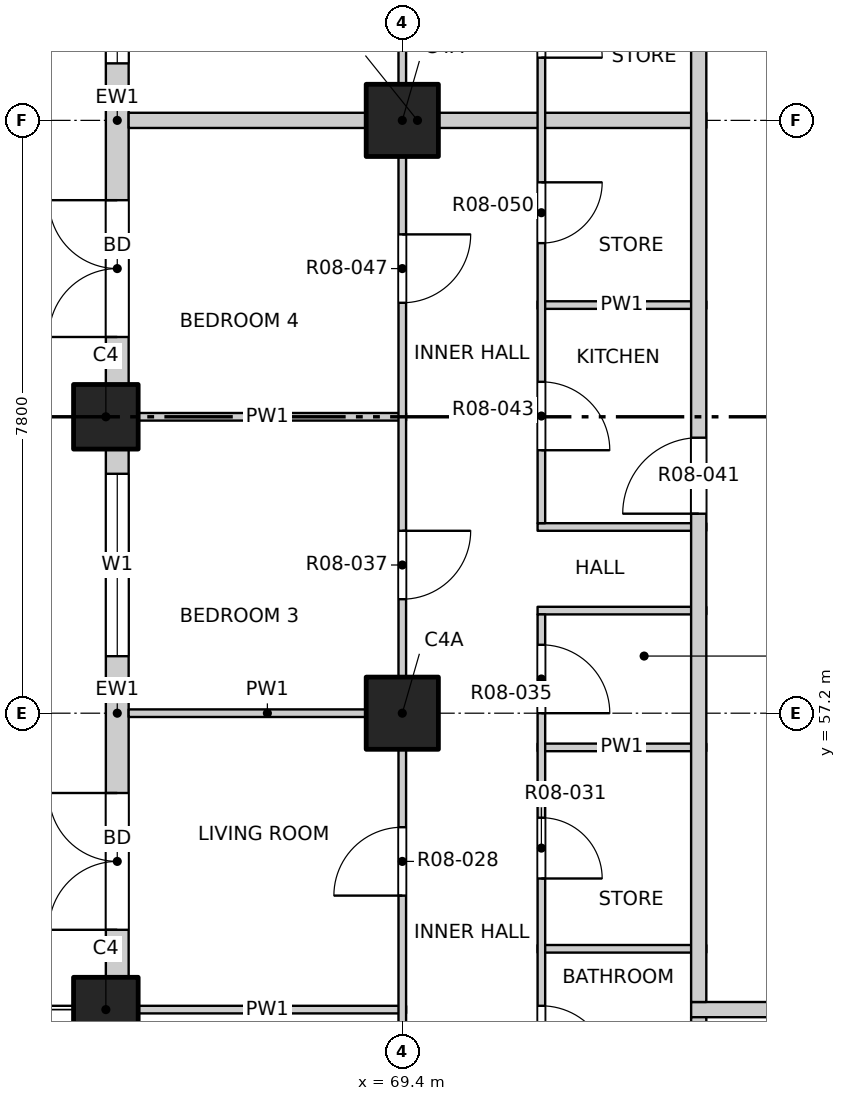
"""IFC4 building model, lengths in metres.
Left out: names, types, materials, properties, quantities, classifications, styles, units other than length and angle.
Written with IfcOpenShell. Run it as: python <this file> out.ifc"""

import sys

from ifc_helpers import new_model, si_unit, direction, frame, frame_2d, origin, origin_2d, place, context, subcontext, project, spatial, rectangle, extrude, element, fill, save


model = new_model("IFC4")
c1 = context("Model", 3, precision=1e-05, world=origin(), true_north=direction((0.0, 1.0)))
c2 = subcontext(c1, "Body", "Model", "MODEL_VIEW")
j1 = project(units=[si_unit("LENGTHUNIT", "METRE"), si_unit("PLANEANGLEUNIT", "RADIAN")], contexts=[c1])
p1 = place(None, origin())
s1 = spatial("IfcSite", under=j1, at=p1, CompositionType="ELEMENT")
p2 = place(p1, origin())
s2 = spatial("IfcBuilding", under=s1, at=p2, CompositionType="ELEMENT")
p3 = place(p2, frame((0.0, 0.0, 103.3)))
s3 = spatial("IfcBuildingStorey", under=s2, at=p3, CompositionType="ELEMENT", Elevation=103.3)
for number, where, z_axis, x_axis in (
    (1, (65.5, 53.3, -0.25), (0.0, 0.0, 1.0), (1.0, 0.0, 0.0)),
    (2, (65.5, 61.1, -0.25), (0.0, 0.0, 1.0), (1.0, 0.0, 0.0)),
):
    element("IfcColumn", number, at=place(p3, frame(where, z_axis=z_axis, x_axis=x_axis)), inside=s3, PredefinedType="COLUMN", context=c2, shape_type="SweptSolid", body=[
        extrude(rectangle(XDim=0.85, YDim=0.85, at=origin_2d()), origin(), (0.0, 0.0, 1.0), 3.4),
    ])
for number, where, z_axis, x_axis in (
    (3, (69.4, 57.2, -0.25), (0.0, 0.0, 1.0), (1.0, 0.0, 0.0)),
    (4, (69.4, 65.0, -0.25), (0.0, 0.0, 1.0), (1.0, 0.0, 0.0)),
):
    element("IfcColumn", number, at=place(p3, frame(where, z_axis=z_axis, x_axis=x_axis)), inside=s3, PredefinedType="COLUMN", context=c2, shape_type="SweptSolid", body=[
        extrude(rectangle(XDim=0.95, YDim=0.95, at=origin_2d()), origin(), (0.0, 0.0, 1.0), 3.4),
    ])
p4 = place(p3, frame((65.65, 53.725, 0.0), z_axis=(0.0, 0.0, 1.0), x_axis=(0.0, 1.0, 0.0)))
e5 = element("IfcWall", 5, at=p4, inside=s3, PredefinedType="SOLIDWALL", context=c2, shape_type="SweptSolid", body=[
    extrude(rectangle(XDim=6.95, YDim=0.3, at=frame_2d((3.475, 0.0))), origin(), (0.0, 0.0, 1.0), 2.7),
])
p5 = place(p4, frame((0.625, 0.0, 0.0)))
e6 = element("IfcOpeningElement", 6, at=p5, cuts=e5, PredefinedType="OPENING", context=c2, shape_type="SweptSolid", body=[
    extrude(rectangle(XDim=1.8, YDim=2.4, at=frame_2d((0.9, 1.2))), frame((0.0, 0.16, 0.0), z_axis=(0.0, -1.0, 0.0), x_axis=(1.0, 0.0, 0.0)), (0.0, 0.0, 1.0), 0.32),
])
p6 = place(p4, frame((4.225, 0.0, 0.9)))
e7 = element("IfcOpeningElement", 7, at=p6, cuts=e5, PredefinedType="OPENING", context=c2, shape_type="SweptSolid", body=[
    extrude(rectangle(XDim=2.4, YDim=1.8, at=frame_2d((1.2, 0.9))), frame((0.0, 0.16, 0.0), z_axis=(0.0, -1.0, 0.0), x_axis=(1.0, 0.0, 0.0)), (0.0, 0.0, 1.0), 0.32),
])
p7 = place(p3, frame((65.65, 61.525, 0.0), z_axis=(0.0, 0.0, 1.0), x_axis=(0.0, 1.0, 0.0)))
e8 = element("IfcWall", 8, at=p7, inside=s3, PredefinedType="SOLIDWALL", context=c2, shape_type="SweptSolid", body=[
    extrude(rectangle(XDim=6.95, YDim=0.3, at=frame_2d((3.475, 0.0))), origin(), (0.0, 0.0, 1.0), 2.7),
])
p8 = place(p7, frame((0.625, 0.0, 0.0)))
e9 = element("IfcOpeningElement", 9, at=p8, cuts=e8, PredefinedType="OPENING", context=c2, shape_type="SweptSolid", body=[
    extrude(rectangle(XDim=1.8, YDim=2.4, at=frame_2d((0.9, 1.2))), frame((0.0, 0.16, 0.0), z_axis=(0.0, -1.0, 0.0), x_axis=(1.0, 0.0, 0.0)), (0.0, 0.0, 1.0), 0.32),
])
p9 = place(p7, frame((4.225, 0.0, 0.9)))
e10 = element("IfcOpeningElement", 10, at=p9, cuts=e8, PredefinedType="OPENING", context=c2, shape_type="SweptSolid", body=[
    extrude(rectangle(XDim=2.4, YDim=1.8, at=frame_2d((1.2, 0.9))), frame((0.0, 0.16, 0.0), z_axis=(0.0, -1.0, 0.0), x_axis=(1.0, 0.0, 0.0)), (0.0, 0.0, 1.0), 0.32),
])
p10 = place(p3, frame((65.8, 53.3, 0.0), z_axis=(0.0, 0.0, 1.0), x_axis=(1.0, 0.0, 0.0)))
e11 = element("IfcWall", 11, at=p10, inside=s3, PredefinedType="PARTITIONING", context=c2, shape_type="SweptSolid", body=[
    extrude(rectangle(XDim=3.65, YDim=0.1, at=frame_2d((1.825, 0.0))), origin(), (0.0, 0.0, 1.0), 3.15),
])
p11 = place(p3, frame((73.2, 53.3, 0.0), z_axis=(0.0, 0.0, 1.0), x_axis=(1.0, 0.0, 0.0)))
e12 = element("IfcWall", 12, at=p11, inside=s3, PredefinedType="PARTITIONING", context=c2, shape_type="SweptSolid", body=[
    extrude(rectangle(XDim=23.6, YDim=0.2, at=frame_2d((11.8, 0.0))), origin(), (0.0, 0.0, 1.0), 3.15),
])
p12 = place(p11, frame((5.975, 0.0, 0.0)))
e13 = element("IfcOpeningElement", 13, at=p12, cuts=e12, PredefinedType="OPENING", context=c2, shape_type="SweptSolid", body=[
    extrude(rectangle(XDim=1.0, YDim=2.1, at=frame_2d((0.5, 1.05))), frame((0.0, 0.11, 0.0), z_axis=(0.0, -1.0, 0.0), x_axis=(1.0, 0.0, 0.0)), (0.0, 0.0, 1.0), 0.22),
])
p13 = place(p11, frame((18.075, 0.0, 0.0)))
e14 = element("IfcOpeningElement", 14, at=p13, cuts=e12, PredefinedType="OPENING", context=c2, shape_type="SweptSolid", body=[
    extrude(rectangle(XDim=1.0, YDim=2.1, at=frame_2d((0.5, 1.05))), frame((0.0, 0.11, 0.0), z_axis=(0.0, -1.0, 0.0), x_axis=(1.0, 0.0, 0.0)), (0.0, 0.0, 1.0), 0.22),
])
for number, where, z_axis, x_axis in (
    (15, (71.18, 54.1, 0.0), (0.0, 0.0, 1.0), (1.0, 0.0, 0.0)),
    (16, (71.18, 56.75, 0.0), (0.0, 0.0, 1.0), (1.0, 0.0, 0.0)),
):
    element("IfcWall", number, at=place(p3, frame(where, z_axis=z_axis, x_axis=x_axis)), inside=s3, PredefinedType="PARTITIONING", context=c2, shape_type="SweptSolid", body=[
        extrude(rectangle(XDim=2.22, YDim=0.1, at=frame_2d((1.11, 0.0))), origin(), (0.0, 0.0, 1.0), 3.15),
    ])
p14 = place(p3, frame((65.8, 57.2, 0.0), z_axis=(0.0, 0.0, 1.0), x_axis=(1.0, 0.0, 0.0)))
e17 = element("IfcWall", 17, at=p14, inside=s3, PredefinedType="PARTITIONING", context=c2, shape_type="SweptSolid", body=[
    extrude(rectangle(XDim=3.65, YDim=0.1, at=frame_2d((1.825, 0.0))), origin(), (0.0, 0.0, 1.0), 3.15),
])
for number, where, z_axis, x_axis in (
    (18, (71.18, 58.55, 0.0), (0.0, 0.0, 1.0), (1.0, 0.0, 0.0)),
    (19, (71.18, 59.65, 0.0), (0.0, 0.0, 1.0), (1.0, 0.0, 0.0)),
):
    element("IfcWall", number, at=place(p3, frame(where, z_axis=z_axis, x_axis=x_axis)), inside=s3, PredefinedType="PARTITIONING", context=c2, shape_type="SweptSolid", body=[
        extrude(rectangle(XDim=2.22, YDim=0.1, at=frame_2d((1.11, 0.0))), origin(), (0.0, 0.0, 1.0), 3.15),
    ])
p15 = place(p3, frame((65.8, 61.1, 0.0), z_axis=(0.0, 0.0, 1.0), x_axis=(1.0, 0.0, 0.0)))
e20 = element("IfcWall", 20, at=p15, inside=s3, PredefinedType="PARTITIONING", context=c2, shape_type="SweptSolid", body=[
    extrude(rectangle(XDim=3.65, YDim=0.1, at=frame_2d((1.825, 0.0))), origin(), (0.0, 0.0, 1.0), 2.55),
])
p16 = place(p3, frame((71.18, 62.57, 0.0), z_axis=(0.0, 0.0, 1.0), x_axis=(1.0, 0.0, 0.0)))
e21 = element("IfcWall", 21, at=p16, inside=s3, PredefinedType="PARTITIONING", context=c2, shape_type="SweptSolid", body=[
    extrude(rectangle(XDim=2.22, YDim=0.1, at=frame_2d((1.11, 0.0))), origin(), (0.0, 0.0, 1.0), 3.15),
])
p17 = place(p3, frame((65.8, 65.0, 0.0), z_axis=(0.0, 0.0, 1.0), x_axis=(1.0, 0.0, 0.0)))
e22 = element("IfcWall", 22, at=p17, inside=s3, PredefinedType="PARTITIONING", context=c2, shape_type="SweptSolid", body=[
    extrude(rectangle(XDim=7.6, YDim=0.2, at=frame_2d((3.8, 0.0))), origin(), (0.0, 0.0, 1.0), 3.15),
])
p18 = place(p3, frame((69.4, 45.8, 0.0), z_axis=(0.0, 0.0, 1.0), x_axis=(0.0, 1.0, 0.0)))
e23 = element("IfcWall", 23, at=p18, inside=s3, PredefinedType="PARTITIONING", context=c2, shape_type="SweptSolid", body=[
    extrude(rectangle(XDim=38.4, YDim=0.1, at=frame_2d((19.2, 0.0))), origin(), (0.0, 0.0, 1.0), 3.15),
])
p19 = place(p18, frame((1.05, 0.0, 0.0)))
e24 = element("IfcOpeningElement", 24, at=p19, cuts=e23, PredefinedType="OPENING", context=c2, shape_type="SweptSolid", body=[
    extrude(rectangle(XDim=1.2, YDim=2.1, at=frame_2d((0.6, 1.05))), frame((0.0, 0.06, 0.0), z_axis=(0.0, -1.0, 0.0), x_axis=(1.0, 0.0, 0.0)), (0.0, 0.0, 1.0), 0.12),
])
p20 = place(p18, frame((5.1, 0.0, 0.0)))
e25 = element("IfcOpeningElement", 25, at=p20, cuts=e23, PredefinedType="OPENING", context=c2, shape_type="SweptSolid", body=[
    extrude(rectangle(XDim=0.9, YDim=2.1, at=frame_2d((0.45, 1.05))), frame((0.0, 0.06, 0.0), z_axis=(0.0, -1.0, 0.0), x_axis=(1.0, 0.0, 0.0)), (0.0, 0.0, 1.0), 0.12),
])
p21 = place(p18, frame((9.0, 0.0, 0.0)))
e26 = element("IfcOpeningElement", 26, at=p21, cuts=e23, PredefinedType="OPENING", context=c2, shape_type="SweptSolid", body=[
    extrude(rectangle(XDim=0.9, YDim=2.1, at=frame_2d((0.45, 1.05))), frame((0.0, 0.06, 0.0), z_axis=(0.0, -1.0, 0.0), x_axis=(1.0, 0.0, 0.0)), (0.0, 0.0, 1.0), 0.12),
])
p22 = place(p18, frame((12.9, 0.0, 0.0)))
e27 = element("IfcOpeningElement", 27, at=p22, cuts=e23, PredefinedType="OPENING", context=c2, shape_type="SweptSolid", body=[
    extrude(rectangle(XDim=0.9, YDim=2.1, at=frame_2d((0.45, 1.05))), frame((0.0, 0.06, 0.0), z_axis=(0.0, -1.0, 0.0), x_axis=(1.0, 0.0, 0.0)), (0.0, 0.0, 1.0), 0.12),
])
p23 = place(p18, frame((16.8, 0.0, 0.0)))
e28 = element("IfcOpeningElement", 28, at=p23, cuts=e23, PredefinedType="OPENING", context=c2, shape_type="SweptSolid", body=[
    extrude(rectangle(XDim=0.9, YDim=2.1, at=frame_2d((0.45, 1.05))), frame((0.0, 0.06, 0.0), z_axis=(0.0, -1.0, 0.0), x_axis=(1.0, 0.0, 0.0)), (0.0, 0.0, 1.0), 0.12),
])
p24 = place(p18, frame((20.7, 0.0, 0.0)))
e29 = element("IfcOpeningElement", 29, at=p24, cuts=e23, PredefinedType="OPENING", context=c2, shape_type="SweptSolid", body=[
    extrude(rectangle(XDim=0.9, YDim=2.1, at=frame_2d((0.45, 1.05))), frame((0.0, 0.06, 0.0), z_axis=(0.0, -1.0, 0.0), x_axis=(1.0, 0.0, 0.0)), (0.0, 0.0, 1.0), 0.12),
])
p25 = place(p18, frame((24.6, 0.0, 0.0)))
e30 = element("IfcOpeningElement", 30, at=p25, cuts=e23, PredefinedType="OPENING", context=c2, shape_type="SweptSolid", body=[
    extrude(rectangle(XDim=0.9, YDim=2.1, at=frame_2d((0.45, 1.05))), frame((0.0, 0.06, 0.0), z_axis=(0.0, -1.0, 0.0), x_axis=(1.0, 0.0, 0.0)), (0.0, 0.0, 1.0), 0.12),
])
p26 = place(p18, frame((28.5, 0.0, 0.0)))
e31 = element("IfcOpeningElement", 31, at=p26, cuts=e23, PredefinedType="OPENING", context=c2, shape_type="SweptSolid", body=[
    extrude(rectangle(XDim=0.9, YDim=2.1, at=frame_2d((0.45, 1.05))), frame((0.0, 0.06, 0.0), z_axis=(0.0, -1.0, 0.0), x_axis=(1.0, 0.0, 0.0)), (0.0, 0.0, 1.0), 0.12),
])
p27 = place(p18, frame((32.4, 0.0, 0.0)))
e32 = element("IfcOpeningElement", 32, at=p27, cuts=e23, PredefinedType="OPENING", context=c2, shape_type="SweptSolid", body=[
    extrude(rectangle(XDim=0.9, YDim=2.1, at=frame_2d((0.45, 1.05))), frame((0.0, 0.06, 0.0), z_axis=(0.0, -1.0, 0.0), x_axis=(1.0, 0.0, 0.0)), (0.0, 0.0, 1.0), 0.12),
])
p28 = place(p18, frame((36.15, 0.0, 0.0)))
e33 = element("IfcOpeningElement", 33, at=p28, cuts=e23, PredefinedType="OPENING", context=c2, shape_type="SweptSolid", body=[
    extrude(rectangle(XDim=1.2, YDim=2.1, at=frame_2d((0.6, 1.05))), frame((0.0, 0.06, 0.0), z_axis=(0.0, -1.0, 0.0), x_axis=(1.0, 0.0, 0.0)), (0.0, 0.0, 1.0), 0.12),
])
p29 = place(p3, frame((71.23, 49.45, 0.0), z_axis=(0.0, 0.0, 1.0), x_axis=(0.0, 1.0, 0.0)))
e34 = element("IfcWall", 34, at=p29, inside=s3, PredefinedType="PARTITIONING", context=c2, shape_type="SweptSolid", body=[
    extrude(rectangle(XDim=9.05, YDim=0.1, at=frame_2d((4.525, 0.0))), origin(), (0.0, 0.0, 1.0), 3.15),
])
p30 = place(p29, frame((0.7, 0.0, 0.0)))
e35 = element("IfcOpeningElement", 35, at=p30, cuts=e34, PredefinedType="OPENING", context=c2, shape_type="SweptSolid", body=[
    extrude(rectangle(XDim=0.8, YDim=2.1, at=frame_2d((0.4, 1.05))), frame((0.0, 0.06, 0.0), z_axis=(0.0, -1.0, 0.0), x_axis=(1.0, 0.0, 0.0)), (0.0, 0.0, 1.0), 0.12),
])
p31 = place(p29, frame((3.0, 0.0, 0.0)))
e36 = element("IfcOpeningElement", 36, at=p31, cuts=e34, PredefinedType="OPENING", context=c2, shape_type="SweptSolid", body=[
    extrude(rectangle(XDim=0.9, YDim=2.1, at=frame_2d((0.45, 1.05))), frame((0.0, 0.06, 0.0), z_axis=(0.0, -1.0, 0.0), x_axis=(1.0, 0.0, 0.0)), (0.0, 0.0, 1.0), 0.12),
])
p32 = place(p29, frame((5.575, 0.0, 0.0)))
e37 = element("IfcOpeningElement", 37, at=p32, cuts=e34, PredefinedType="OPENING", context=c2, shape_type="SweptSolid", body=[
    extrude(rectangle(XDim=0.8, YDim=2.1, at=frame_2d((0.4, 1.05))), frame((0.0, 0.06, 0.0), z_axis=(0.0, -1.0, 0.0), x_axis=(1.0, 0.0, 0.0)), (0.0, 0.0, 1.0), 0.12),
])
p33 = place(p29, frame((7.75, 0.0, 0.0)))
e38 = element("IfcOpeningElement", 38, at=p33, cuts=e34, PredefinedType="OPENING", context=c2, shape_type="SweptSolid", body=[
    extrude(rectangle(XDim=0.9, YDim=2.1, at=frame_2d((0.45, 1.05))), frame((0.0, 0.06, 0.0), z_axis=(0.0, -1.0, 0.0), x_axis=(1.0, 0.0, 0.0)), (0.0, 0.0, 1.0), 0.12),
])
p34 = place(p3, frame((71.23, 59.7, 0.0), z_axis=(0.0, 0.0, 1.0), x_axis=(0.0, 1.0, 0.0)))
e39 = element("IfcWall", 39, at=p34, inside=s3, PredefinedType="PARTITIONING", context=c2, shape_type="SweptSolid", body=[
    extrude(rectangle(XDim=10.9, YDim=0.1, at=frame_2d((5.45, 0.0))), origin(), (0.0, 0.0, 1.0), 3.15),
])
p35 = place(p34, frame((0.96, 0.0, 0.0)))
e40 = element("IfcOpeningElement", 40, at=p35, cuts=e39, PredefinedType="OPENING", context=c2, shape_type="SweptSolid", body=[
    extrude(rectangle(XDim=0.9, YDim=2.1, at=frame_2d((0.45, 1.05))), frame((0.0, 0.06, 0.0), z_axis=(0.0, -1.0, 0.0), x_axis=(1.0, 0.0, 0.0)), (0.0, 0.0, 1.0), 0.12),
])
p36 = place(p34, frame((3.685, 0.0, 0.0)))
e41 = element("IfcOpeningElement", 41, at=p36, cuts=e39, PredefinedType="OPENING", context=c2, shape_type="SweptSolid", body=[
    extrude(rectangle(XDim=0.8, YDim=2.1, at=frame_2d((0.4, 1.05))), frame((0.0, 0.06, 0.0), z_axis=(0.0, -1.0, 0.0), x_axis=(1.0, 0.0, 0.0)), (0.0, 0.0, 1.0), 0.12),
])
p37 = place(p34, frame((6.125, 0.0, 0.0)))
e42 = element("IfcOpeningElement", 42, at=p37, cuts=e39, PredefinedType="OPENING", context=c2, shape_type="SweptSolid", body=[
    extrude(rectangle(XDim=0.8, YDim=2.1, at=frame_2d((0.4, 1.05))), frame((0.0, 0.06, 0.0), z_axis=(0.0, -1.0, 0.0), x_axis=(1.0, 0.0, 0.0)), (0.0, 0.0, 1.0), 0.12),
])
p38 = place(p34, frame((8.9, 0.0, 0.0)))
e43 = element("IfcOpeningElement", 43, at=p38, cuts=e39, PredefinedType="OPENING", context=c2, shape_type="SweptSolid", body=[
    extrude(rectangle(XDim=0.9, YDim=2.1, at=frame_2d((0.45, 1.05))), frame((0.0, 0.06, 0.0), z_axis=(0.0, -1.0, 0.0), x_axis=(1.0, 0.0, 0.0)), (0.0, 0.0, 1.0), 0.12),
])
p39 = place(p3, frame((73.3, 45.8, 0.0), z_axis=(0.0, 0.0, 1.0), x_axis=(0.0, 1.0, 0.0)))
e44 = element("IfcWall", 44, at=p39, inside=s3, PredefinedType="PARTITIONING", context=c2, shape_type="SweptSolid", body=[
    extrude(rectangle(XDim=7.4, YDim=0.2, at=frame_2d((3.7, 0.0))), origin(), (0.0, 0.0, 1.0), 3.15),
])
p40 = place(p3, frame((73.3, 53.4, 0.0), z_axis=(0.0, 0.0, 1.0), x_axis=(0.0, 1.0, 0.0)))
e45 = element("IfcWall", 45, at=p40, inside=s3, PredefinedType="PARTITIONING", context=c2, shape_type="SweptSolid", body=[
    extrude(rectangle(XDim=30.8, YDim=0.2, at=frame_2d((15.4, 0.0))), origin(), (0.0, 0.0, 1.0), 3.15),
])
p41 = place(p40, frame((6.425, 0.0, 0.0)))
e46 = element("IfcOpeningElement", 46, at=p41, cuts=e45, PredefinedType="OPENING", context=c2, shape_type="SweptSolid", body=[
    extrude(rectangle(XDim=1.0, YDim=2.1, at=frame_2d((0.5, 1.05))), frame((0.0, 0.11, 0.0), z_axis=(0.0, -1.0, 0.0), x_axis=(1.0, 0.0, 0.0)), (0.0, 0.0, 1.0), 0.22),
])
p42 = place(p40, frame((18.525, 0.0, 0.0)))
e47 = element("IfcOpeningElement", 47, at=p42, cuts=e45, PredefinedType="OPENING", context=c2, shape_type="SweptSolid", body=[
    extrude(rectangle(XDim=1.0, YDim=2.1, at=frame_2d((0.5, 1.05))), frame((0.0, 0.11, 0.0), z_axis=(0.0, -1.0, 0.0), x_axis=(1.0, 0.0, 0.0)), (0.0, 0.0, 1.0), 0.22),
])
p43 = place(p5, origin())
e48 = element("IfcDoor", 48, at=p43, inside=s3, OperationType="DOUBLE_DOOR_SINGLE_SWING", PredefinedType="DOOR", context=c2, shape_type="SweptSolid", body=[
    extrude(rectangle(XDim=1.8, YDim=2.4, at=frame_2d((0.9, 1.2))), frame((0.0, 0.025, 0.0), z_axis=(0.0, -1.0, 0.0), x_axis=(1.0, 0.0, 0.0)), (0.0, 0.0, 1.0), 0.05),
])
fill(e6, e48)
p44 = place(p6, origin())
e49 = element("IfcWindow", 49, at=p44, inside=s3, PartitioningType="DOUBLE_PANEL_VERTICAL", PredefinedType="WINDOW", context=c2, shape_type="SweptSolid", body=[
    extrude(rectangle(XDim=2.4, YDim=1.8, at=frame_2d((1.2, 0.9))), frame((0.0, 0.03, 0.0), z_axis=(0.0, -1.0, 0.0), x_axis=(1.0, 0.0, 0.0)), (0.0, 0.0, 1.0), 0.06),
])
fill(e7, e49)
p45 = place(p8, origin())
e50 = element("IfcDoor", 50, at=p45, inside=s3, OperationType="DOUBLE_DOOR_SINGLE_SWING", PredefinedType="DOOR", context=c2, shape_type="SweptSolid", body=[
    extrude(rectangle(XDim=1.8, YDim=2.4, at=frame_2d((0.9, 1.2))), frame((0.0, 0.025, 0.0), z_axis=(0.0, -1.0, 0.0), x_axis=(1.0, 0.0, 0.0)), (0.0, 0.0, 1.0), 0.05),
])
fill(e9, e50)
p46 = place(p9, origin())
e51 = element("IfcWindow", 51, at=p46, inside=s3, PartitioningType="DOUBLE_PANEL_VERTICAL", PredefinedType="WINDOW", context=c2, shape_type="SweptSolid", body=[
    extrude(rectangle(XDim=2.4, YDim=1.8, at=frame_2d((1.2, 0.9))), frame((0.0, 0.03, 0.0), z_axis=(0.0, -1.0, 0.0), x_axis=(1.0, 0.0, 0.0)), (0.0, 0.0, 1.0), 0.06),
])
fill(e10, e51)
p47 = place(p31, origin())
e52 = element("IfcDoor", 52, at=p47, inside=s3, OperationType="SINGLE_SWING_RIGHT", PredefinedType="DOOR", context=c2, shape_type="SweptSolid", body=[
    extrude(rectangle(XDim=0.9, YDim=2.1, at=frame_2d((0.45, 1.05))), frame((0.0, 0.025, 0.0), z_axis=(0.0, -1.0, 0.0), x_axis=(1.0, 0.0, 0.0)), (0.0, 0.0, 1.0), 0.05),
])
fill(e36, e52)
p48 = place(p21, origin())
e53 = element("IfcDoor", 53, at=p48, inside=s3, OperationType="SINGLE_SWING_LEFT", PredefinedType="DOOR", context=c2, shape_type="SweptSolid", body=[
    extrude(rectangle(XDim=0.9, YDim=2.1, at=frame_2d((0.45, 1.05))), frame((0.0, 0.025, 0.0), z_axis=(0.0, -1.0, 0.0), x_axis=(1.0, 0.0, 0.0)), (0.0, 0.0, 1.0), 0.05),
])
fill(e26, e53)
p49 = place(p32, origin())
e54 = element("IfcDoor", 54, at=p49, inside=s3, OperationType="SINGLE_SWING_RIGHT", PredefinedType="DOOR", context=c2, shape_type="SweptSolid", body=[
    extrude(rectangle(XDim=0.8, YDim=2.1, at=frame_2d((0.4, 1.05))), frame((0.0, 0.025, 0.0), z_axis=(0.0, -1.0, 0.0), x_axis=(1.0, 0.0, 0.0)), (0.0, 0.0, 1.0), 0.05),
])
fill(e37, e54)
p50 = place(p33, origin())
e55 = element("IfcDoor", 55, at=p50, inside=s3, OperationType="SINGLE_SWING_RIGHT", PredefinedType="DOOR", context=c2, shape_type="SweptSolid", body=[
    extrude(rectangle(XDim=0.9, YDim=2.1, at=frame_2d((0.45, 1.05))), frame((0.0, 0.025, 0.0), z_axis=(0.0, -1.0, 0.0), x_axis=(1.0, 0.0, 0.0)), (0.0, 0.0, 1.0), 0.05),
])
fill(e38, e55)
p51 = place(p22, origin())
e56 = element("IfcDoor", 56, at=p51, inside=s3, OperationType="SINGLE_SWING_LEFT", PredefinedType="DOOR", context=c2, shape_type="SweptSolid", body=[
    extrude(rectangle(XDim=0.9, YDim=2.1, at=frame_2d((0.45, 1.05))), frame((0.0, 0.025, 0.0), z_axis=(0.0, -1.0, 0.0), x_axis=(1.0, 0.0, 0.0)), (0.0, 0.0, 1.0), 0.05),
])
fill(e27, e56)
p52 = place(p41, origin())
e57 = element("IfcDoor", 57, at=p52, inside=s3, OperationType="SINGLE_SWING_RIGHT", PredefinedType="DOOR", context=c2, shape_type="SweptSolid", body=[
    extrude(rectangle(XDim=1.0, YDim=2.1, at=frame_2d((0.5, 1.05))), frame((0.0, 0.025, 0.0), z_axis=(0.0, -1.0, 0.0), x_axis=(1.0, 0.0, 0.0)), (0.0, 0.0, 1.0), 0.05),
])
fill(e46, e57)
p53 = place(p35, origin())
e58 = element("IfcDoor", 58, at=p53, inside=s3, OperationType="SINGLE_SWING_RIGHT", PredefinedType="DOOR", context=c2, shape_type="SweptSolid", body=[
    extrude(rectangle(XDim=0.9, YDim=2.1, at=frame_2d((0.45, 1.05))), frame((0.0, 0.025, 0.0), z_axis=(0.0, -1.0, 0.0), x_axis=(1.0, 0.0, 0.0)), (0.0, 0.0, 1.0), 0.05),
])
fill(e40, e58)
p54 = place(p23, origin())
e59 = element("IfcDoor", 59, at=p54, inside=s3, OperationType="SINGLE_SWING_LEFT", PredefinedType="DOOR", context=c2, shape_type="SweptSolid", body=[
    extrude(rectangle(XDim=0.9, YDim=2.1, at=frame_2d((0.45, 1.05))), frame((0.0, 0.025, 0.0), z_axis=(0.0, -1.0, 0.0), x_axis=(1.0, 0.0, 0.0)), (0.0, 0.0, 1.0), 0.05),
])
fill(e28, e59)
p55 = place(p36, origin())
e60 = element("IfcDoor", 60, at=p55, inside=s3, OperationType="SINGLE_SWING_LEFT", PredefinedType="DOOR", context=c2, shape_type="SweptSolid", body=[
    extrude(rectangle(XDim=0.8, YDim=2.1, at=frame_2d((0.4, 1.05))), frame((0.0, 0.025, 0.0), z_axis=(0.0, -1.0, 0.0), x_axis=(1.0, 0.0, 0.0)), (0.0, 0.0, 1.0), 0.05),
])
fill(e41, e60)
p56 = place(p37, origin())
e61 = element("IfcDoor", 61, at=p56, inside=s3, OperationType="SINGLE_SWING_RIGHT", PredefinedType="DOOR", context=c2, shape_type="SweptSolid", body=[
    extrude(rectangle(XDim=0.8, YDim=2.1, at=frame_2d((0.4, 1.05))), frame((0.0, 0.025, 0.0), z_axis=(0.0, -1.0, 0.0), x_axis=(1.0, 0.0, 0.0)), (0.0, 0.0, 1.0), 0.05),
])
fill(e42, e61)
save(model, sys.argv[1])
